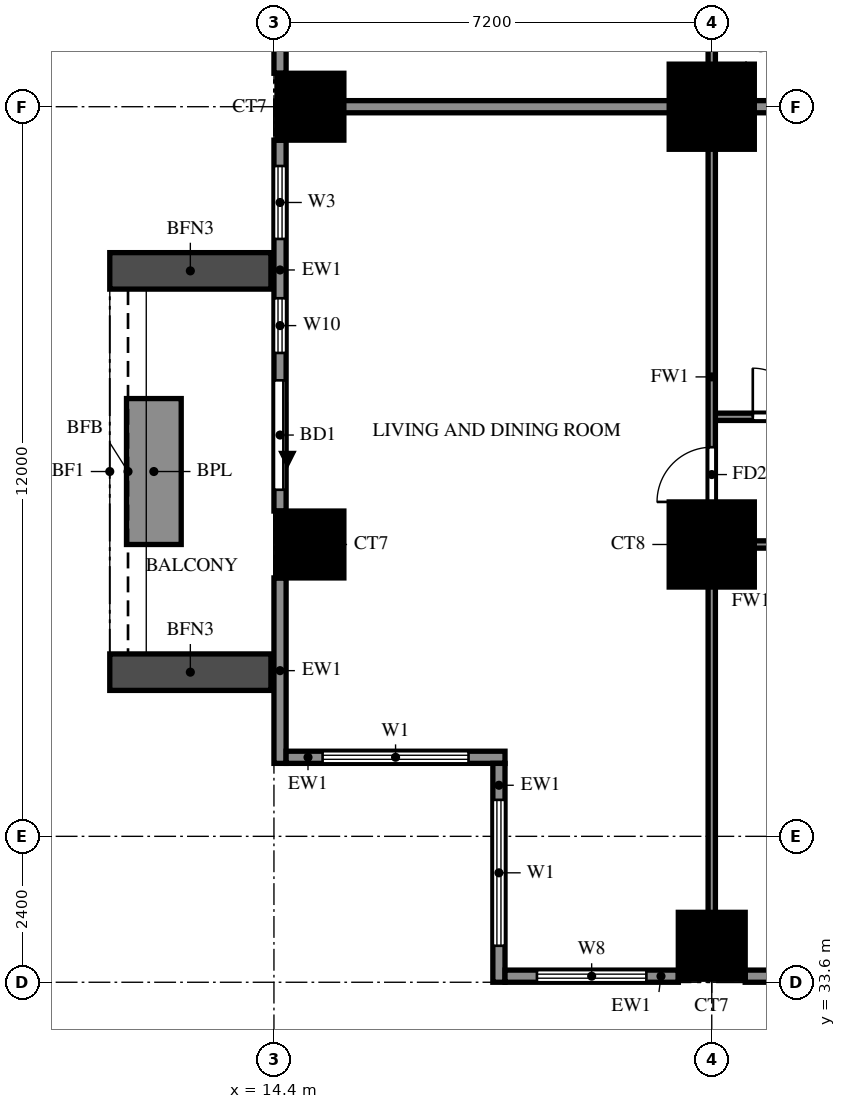
"""IFC4 building model, lengths in metres.
Left out: names, types, materials, properties, quantities, classifications, styles, units other than length and angle.
Written with IfcOpenShell. Run it as: python <this file> out.ifc"""

import sys

from ifc_helpers import new_model, si_unit, direction, frame, frame_2d, origin, origin_2d, place, context, subcontext, project, spatial, rectangle, extrude, source, transform, mapped, element, fill, save


model = new_model("IFC4")
c1 = context("Model", 3, precision=1e-05, world=origin(), true_north=direction((0.0, 1.0)))
c2 = subcontext(c1, "Body", "Model", "MODEL_VIEW")
j1 = project(units=[si_unit("LENGTHUNIT", "METRE"), si_unit("PLANEANGLEUNIT", "RADIAN")], contexts=[c1])
p1 = place(None, origin())
s1 = spatial("IfcSite", under=j1, at=p1, CompositionType="ELEMENT")
p2 = place(p1, origin())
s2 = spatial("IfcBuilding", under=s1, at=p2, CompositionType="ELEMENT")
p3 = place(p2, frame((0.0, 0.0, 51.5)))
s3 = spatial("IfcBuildingStorey", under=s2, at=p3, CompositionType="ELEMENT", Elevation=51.5)
m1 = source(origin(), c2, "Body", "SweptSolid", [
    extrude(rectangle(XDim=1.1, YDim=1.1, at=origin_2d()), origin(), (0.0, 0.0, 1.0), 3.18),
])
for number, where, z_axis, x_axis in (
    (1, (21.6, 34.2, 0.0), (0.0, 0.0, 1.0), (1.0, 0.0, 0.0)),
    (2, (15.0, 40.8, 0.0), (0.0, 0.0, 1.0), (1.0, 0.0, 0.0)),
):
    element("IfcColumn", number, at=place(p3, frame(where, z_axis=z_axis, x_axis=x_axis)), inside=s3, PredefinedType="COLUMN", context=c2, shape_type="MappedRepresentation", body=[
        mapped(m1, transform((0.0, 0.0, 0.0))),
    ])
m2 = source(origin(), c2, "Body", "SweptSolid", [
    extrude(rectangle(XDim=1.4, YDim=1.4, at=origin_2d()), origin(), (0.0, 0.0, 1.0), 3.18),
])
p4 = place(p3, frame((21.6, 40.8, 0.0), z_axis=(0.0, 0.0, 1.0), x_axis=(1.0, 0.0, 0.0)))
e3 = element("IfcColumn", 3, at=p4, inside=s3, PredefinedType="COLUMN", context=c2, shape_type="MappedRepresentation", body=[
    mapped(m2, transform((0.0, 0.0, 0.0))),
])
p5 = place(p3, frame((15.0, 48.0, 0.0), z_axis=(0.0, 0.0, 1.0), x_axis=(1.0, 0.0, 0.0)))
e4 = element("IfcColumn", 4, at=p5, inside=s3, PredefinedType="COLUMN", context=c2, shape_type="MappedRepresentation", body=[
    mapped(m1, transform((0.0, 0.0, 0.0))),
])
p6 = place(p3, frame((21.6, 48.0, 0.0), z_axis=(0.0, 0.0, 1.0), x_axis=(1.0, 0.0, 0.0)))
e5 = element("IfcColumn", 5, at=p6, inside=s3, PredefinedType="COLUMN", context=c2, shape_type="MappedRepresentation", body=[
    mapped(m2, transform((0.0, 0.0, 0.0))),
])
p7 = place(p3, frame((14.5, 54.65, 0.0), z_axis=(0.0, 0.0, 1.0), x_axis=(0.0, -1.0, 0.0)))
e6 = element("IfcWall", 6, at=p7, inside=s3, PredefinedType="SOLIDWALL", context=c2, shape_type="SweptSolid", body=[
    extrude(rectangle(XDim=6.1, YDim=0.2, at=frame_2d((3.05, 0.0))), origin(), (0.0, 0.0, 1.0), 3.18),
])
p8 = place(p7, frame((3.575, 0.0, 0.6)))
e7 = element("IfcOpeningElement", 7, at=p8, cuts=e6, PredefinedType="OPENING", context=c2, shape_type="SweptSolid", body=[
    extrude(rectangle(XDim=1.8, YDim=2.4, at=frame_2d((0.9, 1.2))), frame((0.0, 0.11, 0.0), z_axis=(0.0, -1.0, 0.0), x_axis=(1.0, 0.0, 0.0)), (0.0, 0.0, 1.0), 0.22),
])
p9 = place(p7, frame((2.0, 0.0, 1.5)))
e8 = element("IfcOpeningElement", 8, at=p9, cuts=e6, PredefinedType="OPENING", context=c2, shape_type="SweptSolid", body=[
    extrude(rectangle(XDim=0.9, YDim=0.9, at=frame_2d((0.45, 0.45))), frame((0.0, 0.11, 0.0), z_axis=(0.0, -1.0, 0.0), x_axis=(1.0, 0.0, 0.0)), (0.0, 0.0, 1.0), 0.22),
])
p10 = place(p3, frame((14.5, 47.45, 0.0), z_axis=(0.0, 0.0, 1.0), x_axis=(0.0, -1.0, 0.0)))
e9 = element("IfcWall", 9, at=p10, inside=s3, PredefinedType="SOLIDWALL", context=c2, shape_type="SweptSolid", body=[
    extrude(rectangle(XDim=6.1, YDim=0.2, at=frame_2d((3.05, 0.0))), origin(), (0.0, 0.0, 1.0), 3.18),
])
p11 = place(p10, frame((3.95, 0.0, 0.0)))
e10 = element("IfcOpeningElement", 10, at=p11, cuts=e9, PredefinedType="OPENING", context=c2, shape_type="SweptSolid", body=[
    extrude(rectangle(XDim=1.8, YDim=2.4, at=frame_2d((0.9, 1.2))), frame((0.0, 0.11, 0.0), z_axis=(0.0, -1.0, 0.0), x_axis=(1.0, 0.0, 0.0)), (0.0, 0.0, 1.0), 0.22),
])
p12 = place(p10, frame((0.425, 0.0, 0.6)))
e11 = element("IfcOpeningElement", 11, at=p12, cuts=e9, PredefinedType="OPENING", context=c2, shape_type="SweptSolid", body=[
    extrude(rectangle(XDim=1.2, YDim=2.4, at=frame_2d((0.6, 1.2))), frame((0.0, 0.11, 0.0), z_axis=(0.0, -1.0, 0.0), x_axis=(1.0, 0.0, 0.0)), (0.0, 0.0, 1.0), 0.22),
])
p13 = place(p10, frame((2.6, 0.0, 0.6)))
e12 = element("IfcOpeningElement", 12, at=p13, cuts=e9, PredefinedType="OPENING", context=c2, shape_type="SweptSolid", body=[
    extrude(rectangle(XDim=0.9, YDim=2.4, at=frame_2d((0.45, 1.2))), frame((0.0, 0.11, 0.0), z_axis=(0.0, -1.0, 0.0), x_axis=(1.0, 0.0, 0.0)), (0.0, 0.0, 1.0), 0.22),
])
p14 = place(p3, frame((14.5, 40.25, 0.0), z_axis=(0.0, 0.0, 1.0), x_axis=(0.0, -1.0, 0.0)))
e13 = element("IfcWall", 13, at=p14, inside=s3, PredefinedType="SOLIDWALL", context=c2, shape_type="SweptSolid", body=[
    extrude(rectangle(XDim=3.05, YDim=0.2, at=frame_2d((1.525, 0.0))), origin(), (0.0, 0.0, 1.0), 3.18),
])
p15 = place(p3, frame((14.6, 37.3, 0.0), z_axis=(0.0, 0.0, 1.0), x_axis=(1.0, 0.0, 0.0)))
e14 = element("IfcWall", 14, at=p15, inside=s3, PredefinedType="SOLIDWALL", context=c2, shape_type="SweptSolid", body=[
    extrude(rectangle(XDim=3.6, YDim=0.2, at=frame_2d((1.8, 0.0))), origin(), (0.0, 0.0, 1.0), 3.18),
])
p16 = place(p15, frame((0.6, 0.0, 0.6)))
e15 = element("IfcOpeningElement", 15, at=p16, cuts=e14, PredefinedType="OPENING", context=c2, shape_type="SweptSolid", body=[
    extrude(rectangle(XDim=2.4, YDim=2.4, at=frame_2d((1.2, 1.2))), frame((0.0, 0.11, 0.0), z_axis=(0.0, -1.0, 0.0), x_axis=(1.0, 0.0, 0.0)), (0.0, 0.0, 1.0), 0.22),
])
p17 = place(p3, frame((18.1, 37.2, 0.0), z_axis=(0.0, 0.0, 1.0), x_axis=(0.0, -1.0, 0.0)))
e16 = element("IfcWall", 16, at=p17, inside=s3, PredefinedType="SOLIDWALL", context=c2, shape_type="SweptSolid", body=[
    extrude(rectangle(XDim=3.6, YDim=0.2, at=frame_2d((1.8, 0.0))), origin(), (0.0, 0.0, 1.0), 3.18),
])
p18 = place(p17, frame((0.6, 0.0, 0.6)))
e17 = element("IfcOpeningElement", 17, at=p18, cuts=e16, PredefinedType="OPENING", context=c2, shape_type="SweptSolid", body=[
    extrude(rectangle(XDim=2.4, YDim=2.4, at=frame_2d((1.2, 1.2))), frame((0.0, 0.11, 0.0), z_axis=(0.0, -1.0, 0.0), x_axis=(1.0, 0.0, 0.0)), (0.0, 0.0, 1.0), 0.22),
])
p19 = place(p3, frame((18.2, 33.7, 0.0), z_axis=(0.0, 0.0, 1.0), x_axis=(1.0, 0.0, 0.0)))
e18 = element("IfcWall", 18, at=p19, inside=s3, PredefinedType="SOLIDWALL", context=c2, shape_type="SweptSolid", body=[
    extrude(rectangle(XDim=2.85, YDim=0.2, at=frame_2d((1.425, 0.0))), origin(), (0.0, 0.0, 1.0), 3.18),
])
p20 = place(p19, frame((0.525, 0.0, 0.6)))
e19 = element("IfcOpeningElement", 19, at=p20, cuts=e18, PredefinedType="OPENING", context=c2, shape_type="SweptSolid", body=[
    extrude(rectangle(XDim=1.8, YDim=2.4, at=frame_2d((0.9, 1.2))), frame((0.0, 0.11, 0.0), z_axis=(0.0, -1.0, 0.0), x_axis=(1.0, 0.0, 0.0)), (0.0, 0.0, 1.0), 0.22),
])
p21 = place(p3, frame((22.15, 33.7, 0.0), z_axis=(0.0, 0.0, 1.0), x_axis=(1.0, 0.0, 0.0)))
e20 = element("IfcWall", 20, at=p21, inside=s3, PredefinedType="SOLIDWALL", context=c2, shape_type="SweptSolid", body=[
    extrude(rectangle(XDim=6.1, YDim=0.2, at=frame_2d((3.05, 0.0))), origin(), (0.0, 0.0, 1.0), 3.18),
])
p22 = place(p21, frame((0.725, 0.0, 0.6)))
e21 = element("IfcOpeningElement", 21, at=p22, cuts=e20, PredefinedType="OPENING", context=c2, shape_type="SweptSolid", body=[
    extrude(rectangle(XDim=1.8, YDim=2.4, at=frame_2d((0.9, 1.2))), frame((0.0, 0.11, 0.0), z_axis=(0.0, -1.0, 0.0), x_axis=(1.0, 0.0, 0.0)), (0.0, 0.0, 1.0), 0.22),
])
p23 = place(p21, frame((3.2, 0.0, 1.5)))
e22 = element("IfcOpeningElement", 22, at=p23, cuts=e20, PredefinedType="OPENING", context=c2, shape_type="SweptSolid", body=[
    extrude(rectangle(XDim=0.9, YDim=0.9, at=frame_2d((0.45, 0.45))), frame((0.0, 0.11, 0.0), z_axis=(0.0, -1.0, 0.0), x_axis=(1.0, 0.0, 0.0)), (0.0, 0.0, 1.0), 0.22),
])
for number, where, z_axis, x_axis in (
    (23, (14.35, 45.3, 0.0), (0.0, 0.0, 1.0), (-1.0, 0.0, 0.0)),
    (24, (14.35, 38.7, 0.0), (0.0, 0.0, 1.0), (-1.0, 0.0, 0.0)),
):
    element("IfcWall", number, at=place(p3, frame(where, z_axis=z_axis, x_axis=x_axis)), inside=s3, PredefinedType="SOLIDWALL", context=c2, shape_type="SweptSolid", body=[
        extrude(rectangle(XDim=2.65, YDim=0.6, at=frame_2d((1.325, 0.0))), origin(), (0.0, 0.0, 1.0), 2.85),
    ])
p24 = place(p3, frame((12.425, 43.2, 0.0), z_axis=(0.0, 0.0, 1.0), x_axis=(0.0, -1.0, 0.0)))
e25 = element("IfcWall", 25, at=p24, inside=s3, PredefinedType="SOLIDWALL", context=c2, shape_type="SweptSolid", body=[
    extrude(rectangle(XDim=2.4, YDim=0.9, at=frame_2d((1.2, 0.0))), origin(), (0.0, 0.0, 1.0), 0.9),
])
p25 = place(p3, frame((14.525, 48.0, 0.0), z_axis=(0.0, 0.0, 1.0), x_axis=(1.0, 0.0, 0.0)))
e26 = element("IfcWall", 26, at=p25, inside=s3, PredefinedType="SOLIDWALL", context=c2, shape_type="SweptSolid", body=[
    extrude(rectangle(XDim=19.075, YDim=0.2, at=frame_2d((9.538, 0.0))), origin(), (0.0, 0.0, 1.0), 3.18),
])
p26 = place(p3, frame((21.6, 40.8, 0.0), z_axis=(0.0, 0.0, 1.0), x_axis=(1.0, 0.0, 0.0)))
e27 = element("IfcWall", 27, at=p26, inside=s3, PredefinedType="PARTITIONING", context=c2, shape_type="SweptSolid", body=[
    extrude(rectangle(XDim=3.6, YDim=0.12, at=frame_2d((1.8, 0.0))), origin(), (0.0, 0.0, 1.0), 3.18),
])
p27 = place(p26, frame((1.35, 0.0, 0.0)))
e28 = element("IfcOpeningElement", 28, at=p27, cuts=e27, PredefinedType="OPENING", context=c2, shape_type="SweptSolid", body=[
    extrude(rectangle(XDim=0.9, YDim=2.1, at=frame_2d((0.45, 1.05))), frame((0.0, 0.07, 0.0), z_axis=(0.0, -1.0, 0.0), x_axis=(1.0, 0.0, 0.0)), (0.0, 0.0, 1.0), 0.14),
])
p28 = place(p3, frame((21.6, 42.9, 0.0), z_axis=(0.0, 0.0, 1.0), x_axis=(1.0, 0.0, 0.0)))
e29 = element("IfcWall", 29, at=p28, inside=s3, PredefinedType="PARTITIONING", context=c2, shape_type="SweptSolid", body=[
    extrude(rectangle(XDim=12.0, YDim=0.12, at=frame_2d((6.0, 0.0))), origin(), (0.0, 0.0, 1.0), 3.18),
])
p29 = place(p28, frame((0.675, 0.0, 0.0)))
e30 = element("IfcOpeningElement", 30, at=p29, cuts=e29, PredefinedType="OPENING", context=c2, shape_type="SweptSolid", body=[
    extrude(rectangle(XDim=0.8, YDim=2.1, at=frame_2d((0.4, 1.05))), frame((0.0, 0.07, 0.0), z_axis=(0.0, -1.0, 0.0), x_axis=(1.0, 0.0, 0.0)), (0.0, 0.0, 1.0), 0.14),
])
p30 = place(p28, frame((4.0, 0.0, 0.0)))
e31 = element("IfcOpeningElement", 31, at=p30, cuts=e29, PredefinedType="OPENING", context=c2, shape_type="SweptSolid", body=[
    extrude(rectangle(XDim=0.9, YDim=2.1, at=frame_2d((0.45, 1.05))), frame((0.0, 0.07, 0.0), z_axis=(0.0, -1.0, 0.0), x_axis=(1.0, 0.0, 0.0)), (0.0, 0.0, 1.0), 0.14),
])
p31 = place(p28, frame((7.475, 0.0, 0.0)))
e32 = element("IfcOpeningElement", 32, at=p31, cuts=e29, PredefinedType="OPENING", context=c2, shape_type="SweptSolid", body=[
    extrude(rectangle(XDim=0.9, YDim=2.1, at=frame_2d((0.45, 1.05))), frame((0.0, 0.07, 0.0), z_axis=(0.0, -1.0, 0.0), x_axis=(1.0, 0.0, 0.0)), (0.0, 0.0, 1.0), 0.14),
])
p32 = place(p28, frame((10.1, 0.0, 0.0)))
e33 = element("IfcOpeningElement", 33, at=p32, cuts=e29, PredefinedType="OPENING", context=c2, shape_type="SweptSolid", body=[
    extrude(rectangle(XDim=0.9, YDim=2.1, at=frame_2d((0.45, 1.05))), frame((0.0, 0.07, 0.0), z_axis=(0.0, -1.0, 0.0), x_axis=(1.0, 0.0, 0.0)), (0.0, 0.0, 1.0), 0.14),
])
p33 = place(p3, frame((21.6, 33.725, 0.0), z_axis=(0.0, 0.0, 1.0), x_axis=(0.0, 1.0, 0.0)))
e34 = element("IfcWall", 34, at=p33, inside=s3, PredefinedType="PARTITIONING", context=c2, shape_type="SweptSolid", body=[
    extrude(rectangle(XDim=17.875, YDim=0.12, at=frame_2d((8.938, 0.0))), origin(), (0.0, 0.0, 1.0), 3.18),
])
p34 = place(p33, frame((7.775, 0.0, 0.0)))
e35 = element("IfcOpeningElement", 35, at=p34, cuts=e34, PredefinedType="OPENING", context=c2, shape_type="SweptSolid", body=[
    extrude(rectangle(XDim=0.9, YDim=2.1, at=frame_2d((0.45, 1.05))), frame((0.0, 0.07, 0.0), z_axis=(0.0, -1.0, 0.0), x_axis=(1.0, 0.0, 0.0)), (0.0, 0.0, 1.0), 0.14),
])
p35 = place(p33, frame((15.625, 0.0, 0.0)))
e36 = element("IfcOpeningElement", 36, at=p35, cuts=e34, PredefinedType="OPENING", context=c2, shape_type="SweptSolid", body=[
    extrude(rectangle(XDim=0.9, YDim=2.1, at=frame_2d((0.45, 1.05))), frame((0.0, 0.07, 0.0), z_axis=(0.0, -1.0, 0.0), x_axis=(1.0, 0.0, 0.0)), (0.0, 0.0, 1.0), 0.14),
])
p36 = place(p11, origin())
e37 = element("IfcDoor", 37, at=p36, inside=s3, OperationType="DOUBLE_DOOR_SLIDING", PredefinedType="DOOR", context=c2, shape_type="SweptSolid", body=[
    extrude(rectangle(XDim=1.8, YDim=2.4, at=frame_2d((0.9, 1.2))), frame((0.0, 0.025, 0.0), z_axis=(0.0, -1.0, 0.0), x_axis=(1.0, 0.0, 0.0)), (0.0, 0.0, 1.0), 0.05),
])
fill(e10, e37)
p37 = place(p12, origin())
e38 = element("IfcWindow", 38, at=p37, inside=s3, PartitioningType="SINGLE_PANEL", PredefinedType="WINDOW", context=c2, shape_type="SweptSolid", body=[
    extrude(rectangle(XDim=1.2, YDim=2.4, at=frame_2d((0.6, 1.2))), frame((0.0, 0.03, 0.0), z_axis=(0.0, -1.0, 0.0), x_axis=(1.0, 0.0, 0.0)), (0.0, 0.0, 1.0), 0.06),
])
fill(e11, e38)
p38 = place(p13, origin())
e39 = element("IfcWindow", 39, at=p38, inside=s3, PartitioningType="SINGLE_PANEL", PredefinedType="WINDOW", context=c2, shape_type="SweptSolid", body=[
    extrude(rectangle(XDim=0.9, YDim=2.4, at=frame_2d((0.45, 1.2))), frame((0.0, 0.03, 0.0), z_axis=(0.0, -1.0, 0.0), x_axis=(1.0, 0.0, 0.0)), (0.0, 0.0, 1.0), 0.06),
])
fill(e12, e39)
p39 = place(p16, origin())
e40 = element("IfcWindow", 40, at=p39, inside=s3, PartitioningType="DOUBLE_PANEL_VERTICAL", PredefinedType="WINDOW", context=c2, shape_type="SweptSolid", body=[
    extrude(rectangle(XDim=2.4, YDim=2.4, at=frame_2d((1.2, 1.2))), frame((0.0, 0.03, 0.0), z_axis=(0.0, -1.0, 0.0), x_axis=(1.0, 0.0, 0.0)), (0.0, 0.0, 1.0), 0.06),
])
fill(e15, e40)
p40 = place(p18, origin())
e41 = element("IfcWindow", 41, at=p40, inside=s3, PartitioningType="DOUBLE_PANEL_VERTICAL", PredefinedType="WINDOW", context=c2, shape_type="SweptSolid", body=[
    extrude(rectangle(XDim=2.4, YDim=2.4, at=frame_2d((1.2, 1.2))), frame((0.0, 0.03, 0.0), z_axis=(0.0, -1.0, 0.0), x_axis=(1.0, 0.0, 0.0)), (0.0, 0.0, 1.0), 0.06),
])
fill(e17, e41)
p41 = place(p20, origin())
e42 = element("IfcWindow", 42, at=p41, inside=s3, PartitioningType="DOUBLE_PANEL_VERTICAL", PredefinedType="WINDOW", context=c2, shape_type="SweptSolid", body=[
    extrude(rectangle(XDim=1.8, YDim=2.4, at=frame_2d((0.9, 1.2))), frame((0.0, 0.03, 0.0), z_axis=(0.0, -1.0, 0.0), x_axis=(1.0, 0.0, 0.0)), (0.0, 0.0, 1.0), 0.06),
])
fill(e19, e42)
p42 = place(p34, origin())
e43 = element("IfcDoor", 43, at=p42, inside=s3, OperationType="SINGLE_SWING_RIGHT", PredefinedType="DOOR", context=c2, shape_type="SweptSolid", body=[
    extrude(rectangle(XDim=0.9, YDim=2.1, at=frame_2d((0.45, 1.05))), frame((0.0, 0.025, 0.0), z_axis=(0.0, -1.0, 0.0), x_axis=(1.0, 0.0, 0.0)), (0.0, 0.0, 1.0), 0.05),
])
fill(e35, e43)
p43 = place(p29, origin())
e44 = element("IfcDoor", 44, at=p43, inside=s3, OperationType="SINGLE_SWING_LEFT", PredefinedType="DOOR", context=c2, shape_type="SweptSolid", body=[
    extrude(rectangle(XDim=0.8, YDim=2.1, at=frame_2d((0.4, 1.05))), frame((0.0, 0.025, 0.0), z_axis=(0.0, -1.0, 0.0), x_axis=(1.0, 0.0, 0.0)), (0.0, 0.0, 1.0), 0.05),
])
fill(e30, e44)
save(model, sys.argv[1])
